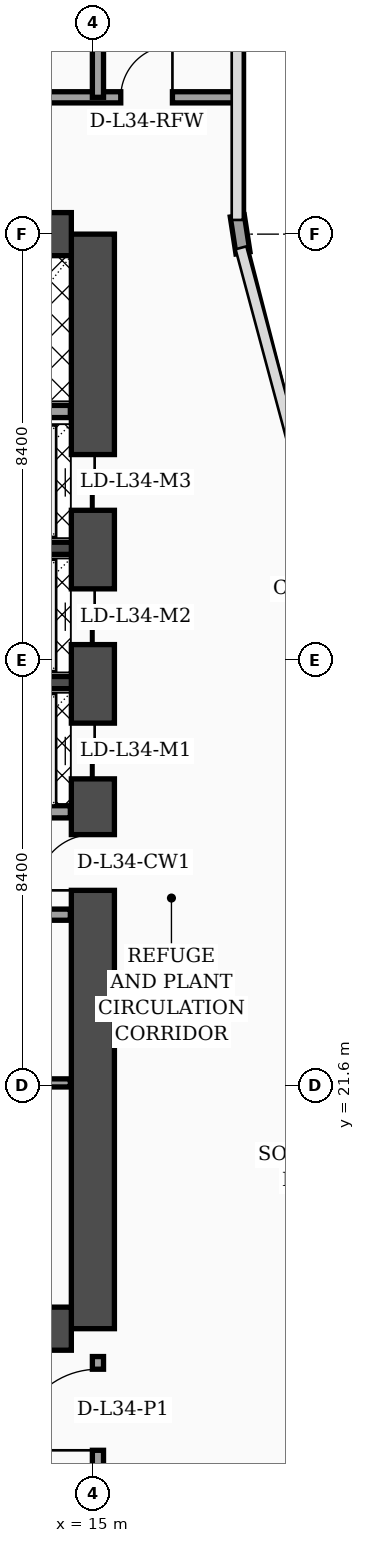
"""IFC4 building model, lengths in metres.
Left out: names, types, materials, properties, quantities, classifications, styles, units other than length and angle.
Written with IfcOpenShell. Run it as: python <this file> out.ifc"""

import sys

from ifc_helpers import new_model, si_unit, direction, frame, frame_2d, origin, place, context, subcontext, project, spatial, rectangle, extrude, element, fill, save


model = new_model("IFC4")
c1 = context("Model", 3, precision=1e-05, world=origin(), true_north=direction((0.0, 1.0)))
c2 = subcontext(c1, "Body", "Model", "MODEL_VIEW")
j1 = project(units=[si_unit("LENGTHUNIT", "METRE"), si_unit("PLANEANGLEUNIT", "RADIAN")], contexts=[c1])
p1 = place(None, origin())
s1 = spatial("IfcSite", under=j1, at=p1, CompositionType="ELEMENT")
p2 = place(p1, origin())
s2 = spatial("IfcBuilding", under=s1, at=p2, CompositionType="ELEMENT")
p3 = place(p2, frame((0.0, 0.0, 139.2)))
s3 = spatial("IfcBuildingStorey", under=s2, at=p3, CompositionType="ELEMENT", Elevation=139.2)
p4 = place(p3, frame((15.0, 16.8, 0.0), z_axis=(0.0, 0.0, 1.0), x_axis=(0.0, 1.0, 0.0)))
e1 = element("IfcWall", 1, at=p4, inside=s3, PredefinedType="SHEAR", context=c2, shape_type="SweptSolid", body=[
    extrude(rectangle(XDim=21.6, YDim=0.85, at=frame_2d((10.8, 0.0))), origin(), (0.0, 0.0, 1.0), 4.56),
])
p5 = place(p4, frame((8.65, 0.0, 0.0)))
e2 = element("IfcOpeningElement", 2, at=p5, cuts=e1, PredefinedType="OPENING", context=c2, shape_type="SweptSolid", body=[
    extrude(rectangle(XDim=1.1, YDim=2.2, at=frame_2d((0.55, 1.1))), frame((0.0, 0.435, 0.0), z_axis=(0.0, -1.0, 0.0), x_axis=(1.0, 0.0, 0.0)), (0.0, 0.0, 1.0), 0.87),
])
p6 = place(p4, frame((10.85, 0.0, 0.0)))
e3 = element("IfcOpeningElement", 3, at=p6, cuts=e1, PredefinedType="OPENING", context=c2, shape_type="SweptSolid", body=[
    extrude(rectangle(XDim=1.1, YDim=2.2, at=frame_2d((0.55, 1.1))), frame((0.0, 0.435, 0.0), z_axis=(0.0, -1.0, 0.0), x_axis=(1.0, 0.0, 0.0)), (0.0, 0.0, 1.0), 0.87),
])
p7 = place(p4, frame((13.5, 0.0, 0.0)))
e4 = element("IfcOpeningElement", 4, at=p7, cuts=e1, PredefinedType="OPENING", context=c2, shape_type="SweptSolid", body=[
    extrude(rectangle(XDim=1.1, YDim=2.2, at=frame_2d((0.55, 1.1))), frame((0.0, 0.435, 0.0), z_axis=(0.0, -1.0, 0.0), x_axis=(1.0, 0.0, 0.0)), (0.0, 0.0, 1.0), 0.87),
])
p8 = place(p4, frame((16.15, 0.0, 0.0)))
e5 = element("IfcOpeningElement", 5, at=p8, cuts=e1, PredefinedType="OPENING", context=c2, shape_type="SweptSolid", body=[
    extrude(rectangle(XDim=1.1, YDim=2.2, at=frame_2d((0.55, 1.1))), frame((0.0, 0.435, 0.0), z_axis=(0.0, -1.0, 0.0), x_axis=(1.0, 0.0, 0.0)), (0.0, 0.0, 1.0), 0.87),
])
for number, where, z_axis, x_axis in (
    (6, (4.625, 38.4, 0.0), (0.0, 0.0, 1.0), (1.0, 0.0, 0.0)),
    (7, (4.625, 16.8, 0.0), (0.0, 0.0, 1.0), (1.0, 0.0, 0.0)),
):
    element("IfcWall", number, at=place(p3, frame(where, z_axis=z_axis, x_axis=x_axis)), inside=s3, PredefinedType="SHEAR", context=c2, shape_type="SweptSolid", body=[
        extrude(rectangle(XDim=9.95, YDim=0.85, at=frame_2d((4.975, 0.0))), origin(), (0.0, 0.0, 1.0), 4.56),
    ])
for number, where, z_axis, x_axis in (
    (8, (12.18, 29.55, 0.0), (0.0, 0.0, 1.0), (1.0, 0.0, 0.0)),
    (9, (12.18, 32.2, 0.0), (0.0, 0.0, 1.0), (1.0, 0.0, 0.0)),
):
    element("IfcWall", number, at=place(p3, frame(where, z_axis=z_axis, x_axis=x_axis)), inside=s3, PredefinedType="SOLIDWALL", context=c2, shape_type="SweptSolid", body=[
        extrude(rectangle(XDim=2.395, YDim=0.24, at=frame_2d((1.198, 0.0))), origin(), (0.0, 0.0, 1.0), 4.56),
    ])
p9 = place(p3, frame((17.962, 38.03, 0.0), z_axis=(0.0, 0.0, 1.0), x_axis=(-0.15141125477, 0.988470855377, 0.0)))
e10 = element("IfcWall", 10, at=p9, inside=s3, PredefinedType="SOLIDWALL", context=c2, shape_type="SweptSolid", body=[
    extrude(rectangle(XDim=0.739, YDim=0.28, at=frame_2d((0.369, 0.0))), origin(), (0.0, 0.0, 1.0), 4.56),
])
p10 = place(p3, frame((9.68, 21.65, 0.0), z_axis=(0.0, 0.0, 1.0), x_axis=(1.0, 0.0, 0.0)))
e11 = element("IfcWall", 11, at=p10, inside=s3, PredefinedType="PARTITIONING", context=c2, shape_type="SweptSolid", body=[
    extrude(rectangle(XDim=4.875, YDim=0.16, at=frame_2d((2.438, 0.0))), origin(), (0.0, 0.0, 1.0), 4.56),
])
p11 = place(p10, frame((1.1, 0.0, 0.0)))
e12 = element("IfcOpeningElement", 12, at=p11, cuts=e11, PredefinedType="OPENING", context=c2, shape_type="SweptSolid", body=[
    extrude(rectangle(XDim=0.98, YDim=2.15, at=frame_2d((0.49, 1.075))), frame((0.0, 0.09, 0.0), z_axis=(0.0, -1.0, 0.0), x_axis=(1.0, 0.0, 0.0)), (0.0, 0.0, 1.0), 0.18),
])
p12 = place(p3, frame((9.68, 24.97, 0.0), z_axis=(0.0, 0.0, 1.0), x_axis=(1.0, 0.0, 0.0)))
e13 = element("IfcWall", 13, at=p12, inside=s3, PredefinedType="SOLIDWALL", context=c2, shape_type="SweptSolid", body=[
    extrude(rectangle(XDim=4.875, YDim=0.22, at=frame_2d((2.438, 0.0))), origin(), (0.0, 0.0, 1.0), 3.84),
])
p13 = place(p12, frame((0.9, 0.0, 0.0)))
e14 = element("IfcOpeningElement", 14, at=p13, cuts=e13, PredefinedType="OPENING", context=c2, shape_type="SweptSolid", body=[
    extrude(rectangle(XDim=0.98, YDim=2.15, at=frame_2d((0.49, 1.075))), frame((0.0, 0.12, 0.0), z_axis=(0.0, -1.0, 0.0), x_axis=(1.0, 0.0, 0.0)), (0.0, 0.0, 1.0), 0.24),
])
p14 = place(p3, frame((12.25, 27.0, 0.0), z_axis=(0.0, 0.0, 1.0), x_axis=(1.0, 0.0, 0.0)))
e15 = element("IfcWall", 15, at=p14, inside=s3, PredefinedType="SOLIDWALL", context=c2, shape_type="SweptSolid", body=[
    extrude(rectangle(XDim=2.305, YDim=0.24, at=frame_2d((1.152, 0.0))), origin(), (0.0, 0.0, 1.0), 4.56),
])
p15 = place(p3, frame((9.66, 34.9, 0.0), z_axis=(0.0, 0.0, 1.0), x_axis=(1.0, 0.0, 0.0)))
e16 = element("IfcWall", 16, at=p15, inside=s3, PredefinedType="SOLIDWALL", context=c2, shape_type="SweptSolid", body=[
    extrude(rectangle(XDim=4.895, YDim=0.24, at=frame_2d((2.448, 0.0))), origin(), (0.0, 0.0, 1.0), 4.56),
])
p16 = place(p3, frame((4.2, 41.1, 0.0), z_axis=(0.0, 0.0, 1.0), x_axis=(1.0, 0.0, 0.0)))
e17 = element("IfcWall", 17, at=p16, inside=s3, PredefinedType="SOLIDWALL", context=c2, shape_type="SweptSolid", body=[
    extrude(rectangle(XDim=13.65, YDim=0.22, at=frame_2d((6.825, 0.0))), origin(), (0.0, 0.0, 1.0), 3.84),
])
p17 = place(p16, frame((1.8, 0.0, 0.0)))
e18 = element("IfcOpeningElement", 18, at=p17, cuts=e17, PredefinedType="OPENING", context=c2, shape_type="SweptSolid", body=[
    extrude(rectangle(XDim=0.98, YDim=2.15, at=frame_2d((0.49, 1.075))), frame((0.0, 0.12, 0.0), z_axis=(0.0, -1.0, 0.0), x_axis=(1.0, 0.0, 0.0)), (0.0, 0.0, 1.0), 0.24),
])
p18 = place(p16, frame((6.8, 0.0, 0.0)))
e19 = element("IfcOpeningElement", 19, at=p18, cuts=e17, PredefinedType="OPENING", context=c2, shape_type="SweptSolid", body=[
    extrude(rectangle(XDim=1.15, YDim=2.2, at=frame_2d((0.575, 1.1))), frame((0.0, 0.12, 0.0), z_axis=(0.0, -1.0, 0.0), x_axis=(1.0, 0.0, 0.0)), (0.0, 0.0, 1.0), 0.24),
])
p19 = place(p16, frame((11.35, 0.0, 0.0)))
e20 = element("IfcOpeningElement", 20, at=p19, cuts=e17, PredefinedType="OPENING", context=c2, shape_type="SweptSolid", body=[
    extrude(rectangle(XDim=1.02, YDim=2.2, at=frame_2d((0.51, 1.1))), frame((0.0, 0.12, 0.0), z_axis=(0.0, -1.0, 0.0), x_axis=(1.0, 0.0, 0.0)), (0.0, 0.0, 1.0), 0.24),
])
p20 = place(p3, frame((15.1, 41.1, 0.0), z_axis=(0.0, 0.0, 1.0), x_axis=(0.0, 1.0, 0.0)))
e21 = element("IfcWall", 21, at=p20, inside=s3, PredefinedType="SOLIDWALL", context=c2, shape_type="SweptSolid", body=[
    extrude(rectangle(XDim=6.7, YDim=0.22, at=frame_2d((3.35, 0.0))), origin(), (0.0, 0.0, 1.0), 3.84),
])
p21 = place(p3, frame((15.1, 4.2, 0.0), z_axis=(0.0, 0.0, 1.0), x_axis=(0.0, 1.0, 0.0)))
e22 = element("IfcWall", 22, at=p21, inside=s3, PredefinedType="SOLIDWALL", context=c2, shape_type="SweptSolid", body=[
    extrude(rectangle(XDim=12.05, YDim=0.22, at=frame_2d((6.025, 0.0))), origin(), (0.0, 0.0, 1.0), 3.49),
])
p22 = place(p21, frame((10.2, 0.0, 0.0)))
e23 = element("IfcOpeningElement", 23, at=p22, cuts=e22, PredefinedType="OPENING", context=c2, shape_type="SweptSolid", body=[
    extrude(rectangle(XDim=1.6, YDim=2.35, at=frame_2d((0.8, 1.175))), frame((0.0, 0.12, 0.0), z_axis=(0.0, -1.0, 0.0), x_axis=(1.0, 0.0, 0.0)), (0.0, 0.0, 1.0), 0.24),
])
p23 = place(p19, origin())
e24 = element("IfcDoor", 24, at=p23, inside=s3, OperationType="SINGLE_SWING_RIGHT", PredefinedType="DOOR", context=c2, shape_type="SweptSolid", body=[
    extrude(rectangle(XDim=1.02, YDim=2.2, at=frame_2d((0.51, 1.1))), frame((0.0, 0.025, 0.0), z_axis=(0.0, -1.0, 0.0), x_axis=(1.0, 0.0, 0.0)), (0.0, 0.0, 1.0), 0.05),
])
fill(e20, e24)
p24 = place(p22, origin())
e25 = element("IfcDoor", 25, at=p24, inside=s3, OperationType="SINGLE_SWING_LEFT", PredefinedType="DOOR", context=c2, shape_type="SweptSolid", body=[
    extrude(rectangle(XDim=1.6, YDim=2.35, at=frame_2d((0.8, 1.175))), frame((0.0, 0.025, 0.0), z_axis=(0.0, -1.0, 0.0), x_axis=(1.0, 0.0, 0.0)), (0.0, 0.0, 1.0), 0.05),
])
fill(e23, e25)
p25 = place(p5, origin())
e26 = element("IfcDoor", 26, at=p25, inside=s3, OperationType="SINGLE_SWING_LEFT", PredefinedType="DOOR", context=c2, shape_type="SweptSolid", body=[
    extrude(rectangle(XDim=1.1, YDim=2.2, at=frame_2d((0.55, 1.1))), frame((0.0, 0.025, 0.0), z_axis=(0.0, -1.0, 0.0), x_axis=(1.0, 0.0, 0.0)), (0.0, 0.0, 1.0), 0.05),
])
fill(e2, e26)
p26 = place(p6, origin())
e27 = element("IfcDoor", 27, at=p26, inside=s3, OperationType="DOUBLE_DOOR_SLIDING", PredefinedType="DOOR", context=c2, shape_type="SweptSolid", body=[
    extrude(rectangle(XDim=1.1, YDim=2.2, at=frame_2d((0.55, 1.1))), frame((0.0, 0.025, 0.0), z_axis=(0.0, -1.0, 0.0), x_axis=(1.0, 0.0, 0.0)), (0.0, 0.0, 1.0), 0.05),
])
fill(e3, e27)
p27 = place(p7, origin())
e28 = element("IfcDoor", 28, at=p27, inside=s3, OperationType="DOUBLE_DOOR_SLIDING", PredefinedType="DOOR", context=c2, shape_type="SweptSolid", body=[
    extrude(rectangle(XDim=1.1, YDim=2.2, at=frame_2d((0.55, 1.1))), frame((0.0, 0.025, 0.0), z_axis=(0.0, -1.0, 0.0), x_axis=(1.0, 0.0, 0.0)), (0.0, 0.0, 1.0), 0.05),
])
fill(e4, e28)
p28 = place(p8, origin())
e29 = element("IfcDoor", 29, at=p28, inside=s3, OperationType="DOUBLE_DOOR_SLIDING", PredefinedType="DOOR", context=c2, shape_type="SweptSolid", body=[
    extrude(rectangle(XDim=1.1, YDim=2.2, at=frame_2d((0.55, 1.1))), frame((0.0, 0.025, 0.0), z_axis=(0.0, -1.0, 0.0), x_axis=(1.0, 0.0, 0.0)), (0.0, 0.0, 1.0), 0.05),
])
fill(e5, e29)
save(model, sys.argv[1])
